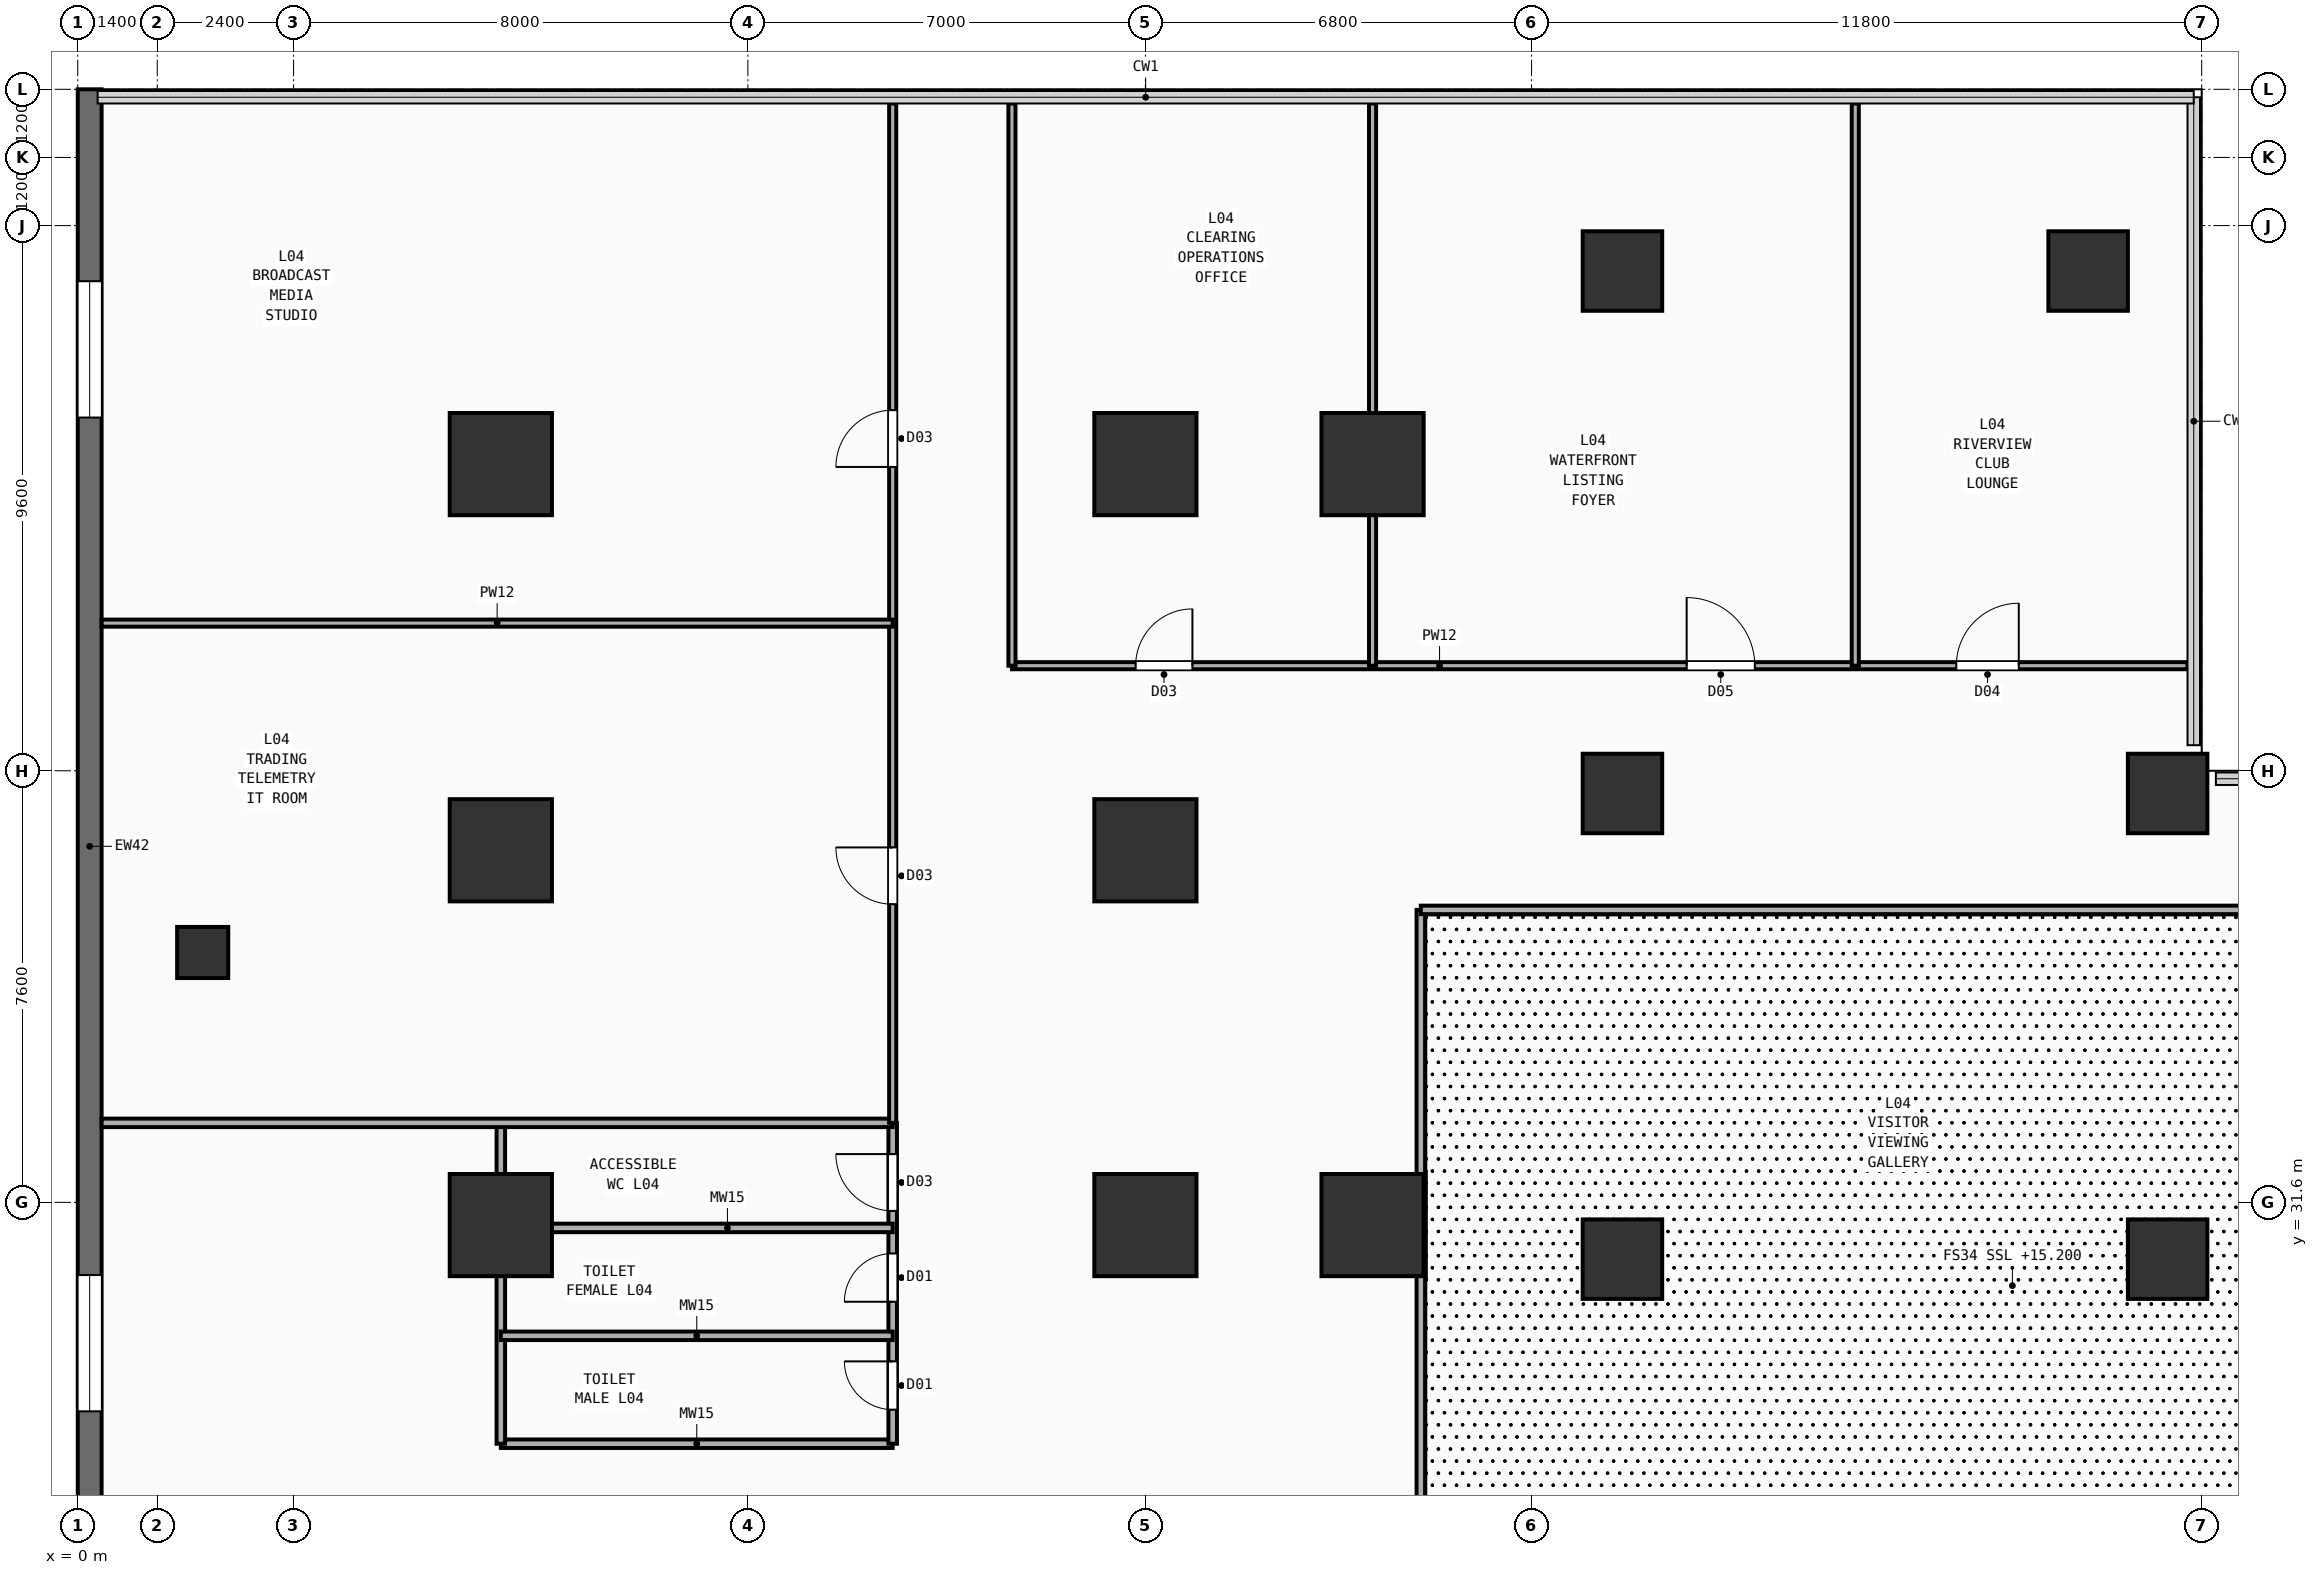
"""IFC4 building model, lengths in metres.
Left out: names, types, materials, properties, quantities, classifications, styles, units other than length and angle.
Written with IfcOpenShell. Run it as: python <this file> out.ifc"""

import sys

from ifc_helpers import new_model, si_unit, direction, frame, frame_2d, origin, origin_2d, place, context, subcontext, project, spatial, rectangle, extrude, element, fill, save


model = new_model("IFC4")
c1 = context("Model", 3, precision=1e-05, world=origin(), true_north=direction((0.0, 1.0)))
c2 = subcontext(c1, "Body", "Model", "MODEL_VIEW")
j1 = project(units=[si_unit("LENGTHUNIT", "METRE"), si_unit("PLANEANGLEUNIT", "RADIAN")], contexts=[c1])
p1 = place(None, origin())
s1 = spatial("IfcSite", under=j1, at=p1, CompositionType="ELEMENT")
p2 = place(p1, origin())
s2 = spatial("IfcBuilding", under=s1, at=p2, CompositionType="ELEMENT")
p3 = place(p2, frame((0.0, 0.0, 15.2)))
s3 = spatial("IfcBuildingStorey", under=s2, at=p3, CompositionType="ELEMENT", Elevation=15.2)
for number, where, z_axis, x_axis in (
    (1, (7.45, 31.2, 0.0), (0.0, 0.0, 1.0), (1.0, 0.0, 0.0)),
    (2, (7.45, 37.8, 0.0), (0.0, 0.0, 1.0), (1.0, 0.0, 0.0)),
    (3, (7.45, 44.6, 0.0), (0.0, 0.0, 1.0), (1.0, 0.0, 0.0)),
    (4, (18.8, 31.2, 0.0), (0.0, 0.0, 1.0), (1.0, 0.0, 0.0)),
    (5, (18.8, 37.8, 0.0), (0.0, 0.0, 1.0), (1.0, 0.0, 0.0)),
    (6, (18.8, 44.6, 0.0), (0.0, 0.0, 1.0), (1.0, 0.0, 0.0)),
    (7, (22.8, 31.2, 0.0), (0.0, 0.0, 1.0), (1.0, 0.0, 0.0)),
    (8, (22.8, 44.6, 0.0), (0.0, 0.0, 1.0), (1.0, 0.0, 0.0)),
):
    element("IfcColumn", number, at=place(p3, frame(where, z_axis=z_axis, x_axis=x_axis)), inside=s3, PredefinedType="COLUMN", context=c2, shape_type="SweptSolid", body=[
        extrude(rectangle(XDim=1.8, YDim=1.8, at=origin_2d()), origin(), (0.0, 0.0, 1.0), 4.46),
    ])
for number, where, z_axis, x_axis in (
    (9, (27.2, 30.6, 0.0), (0.0, 0.0, 1.0), (1.0, 0.0, 0.0)),
    (10, (36.8, 30.6, 0.0), (0.0, 0.0, 1.0), (1.0, 0.0, 0.0)),
    (11, (27.2, 38.8, 0.0), (0.0, 0.0, 1.0), (1.0, 0.0, 0.0)),
    (12, (36.8, 38.8, 0.0), (0.0, 0.0, 1.0), (1.0, 0.0, 0.0)),
    (13, (27.2, 48.0, 0.0), (0.0, 0.0, 1.0), (1.0, 0.0, 0.0)),
    (14, (35.4, 48.0, 0.0), (0.0, 0.0, 1.0), (1.0, 0.0, 0.0)),
):
    element("IfcColumn", number, at=place(p3, frame(where, z_axis=z_axis, x_axis=x_axis)), inside=s3, PredefinedType="COLUMN", context=c2, shape_type="SweptSolid", body=[
        extrude(rectangle(XDim=1.4, YDim=1.4, at=origin_2d()), origin(), (0.0, 0.0, 1.0), 4.46),
    ])
p4 = place(p3, frame((2.2, 36.0, 0.0), z_axis=(0.0, 0.0, 1.0), x_axis=(1.0, 0.0, 0.0)))
e15 = element("IfcColumn", 15, at=p4, inside=s3, PredefinedType="PILASTER", context=c2, shape_type="SweptSolid", body=[
    extrude(rectangle(XDim=0.9, YDim=0.9, at=origin_2d()), origin(), (0.0, 0.0, 1.0), 4.46),
])
p5 = place(p3, frame((0.21, 0.42, 0.0), z_axis=(0.0, 0.0, 1.0), x_axis=(0.0, 1.0, 0.0)))
e16 = element("IfcWall", 16, at=p5, inside=s3, PredefinedType="SOLIDWALL", context=c2, shape_type="SweptSolid", body=[
    extrude(rectangle(XDim=50.78, YDim=0.42, at=frame_2d((25.39, 0.0))), origin(), (0.0, 0.0, 1.0), 4.46),
])
p6 = place(p5, frame((8.0, 0.0, 0.95)))
e17 = element("IfcOpeningElement", 17, at=p6, cuts=e16, PredefinedType="OPENING", context=c2, shape_type="SweptSolid", body=[
    extrude(rectangle(XDim=2.4, YDim=2.1, at=frame_2d((1.2, 1.05))), frame((0.0, 0.22, 0.0), z_axis=(0.0, -1.0, 0.0), x_axis=(1.0, 0.0, 0.0)), (0.0, 0.0, 1.0), 0.44),
])
p7 = place(p5, frame((18.0, 0.0, 0.95)))
e18 = element("IfcOpeningElement", 18, at=p7, cuts=e16, PredefinedType="OPENING", context=c2, shape_type="SweptSolid", body=[
    extrude(rectangle(XDim=2.4, YDim=2.1, at=frame_2d((1.2, 1.05))), frame((0.0, 0.22, 0.0), z_axis=(0.0, -1.0, 0.0), x_axis=(1.0, 0.0, 0.0)), (0.0, 0.0, 1.0), 0.44),
])
p8 = place(p5, frame((27.5, 0.0, 0.95)))
e19 = element("IfcOpeningElement", 19, at=p8, cuts=e16, PredefinedType="OPENING", context=c2, shape_type="SweptSolid", body=[
    extrude(rectangle(XDim=2.4, YDim=2.1, at=frame_2d((1.2, 1.05))), frame((0.0, 0.22, 0.0), z_axis=(0.0, -1.0, 0.0), x_axis=(1.0, 0.0, 0.0)), (0.0, 0.0, 1.0), 0.44),
])
p9 = place(p5, frame((45.0, 0.0, 0.95)))
e20 = element("IfcOpeningElement", 20, at=p9, cuts=e16, PredefinedType="OPENING", context=c2, shape_type="SweptSolid", body=[
    extrude(rectangle(XDim=2.4, YDim=2.1, at=frame_2d((1.2, 1.05))), frame((0.0, 0.22, 0.0), z_axis=(0.0, -1.0, 0.0), x_axis=(1.0, 0.0, 0.0)), (0.0, 0.0, 1.0), 0.44),
])
p10 = place(p3, frame((7.45, 27.35, 0.0), z_axis=(0.0, 0.0, 1.0), x_axis=(1.0, 0.0, 0.0)))
e21 = element("IfcWall", 21, at=p10, inside=s3, PredefinedType="PLUMBINGWALL", context=c2, shape_type="SweptSolid", body=[
    extrude(rectangle(XDim=6.9, YDim=0.15, at=frame_2d((3.45, 0.0))), origin(), (0.0, 0.0, 1.0), 4.46),
])
p11 = place(p3, frame((7.45, 27.35, 0.0), z_axis=(0.0, 0.0, 1.0), x_axis=(0.0, 1.0, 0.0)))
e22 = element("IfcWall", 22, at=p11, inside=s3, PredefinedType="PLUMBINGWALL", context=c2, shape_type="SweptSolid", body=[
    extrude(rectangle(XDim=5.65, YDim=0.15, at=frame_2d((2.825, 0.0))), origin(), (0.0, 0.0, 1.0), 4.1),
])
p12 = place(p3, frame((14.35, 27.35, 0.0), z_axis=(0.0, 0.0, 1.0), x_axis=(0.0, 1.0, 0.0)))
e23 = element("IfcWall", 23, at=p12, inside=s3, PredefinedType="PLUMBINGWALL", context=c2, shape_type="SweptSolid", body=[
    extrude(rectangle(XDim=5.65, YDim=0.15, at=frame_2d((2.825, 0.0))), origin(), (0.0, 0.0, 1.0), 4.46),
])
p13 = place(p12, frame((0.6, 0.0, 0.0)))
e24 = element("IfcOpeningElement", 24, at=p13, cuts=e23, PredefinedType="OPENING", context=c2, shape_type="SweptSolid", body=[
    extrude(rectangle(XDim=0.85, YDim=2.15, at=frame_2d((0.425, 1.075))), frame((0.0, 0.085, 0.0), z_axis=(0.0, -1.0, 0.0), x_axis=(1.0, 0.0, 0.0)), (0.0, 0.0, 1.0), 0.17),
])
p14 = place(p12, frame((2.5, 0.0, 0.0)))
e25 = element("IfcOpeningElement", 25, at=p14, cuts=e23, PredefinedType="OPENING", context=c2, shape_type="SweptSolid", body=[
    extrude(rectangle(XDim=0.85, YDim=2.15, at=frame_2d((0.425, 1.075))), frame((0.0, 0.085, 0.0), z_axis=(0.0, -1.0, 0.0), x_axis=(1.0, 0.0, 0.0)), (0.0, 0.0, 1.0), 0.17),
])
p15 = place(p12, frame((4.1, 0.0, 0.0)))
e26 = element("IfcOpeningElement", 26, at=p15, cuts=e23, PredefinedType="OPENING", context=c2, shape_type="SweptSolid", body=[
    extrude(rectangle(XDim=1.0, YDim=2.2, at=frame_2d((0.5, 1.1))), frame((0.0, 0.085, 0.0), z_axis=(0.0, -1.0, 0.0), x_axis=(1.0, 0.0, 0.0)), (0.0, 0.0, 1.0), 0.17),
])
p16 = place(p3, frame((7.45, 29.25, 0.0), z_axis=(0.0, 0.0, 1.0), x_axis=(1.0, 0.0, 0.0)))
e27 = element("IfcWall", 27, at=p16, inside=s3, PredefinedType="PLUMBINGWALL", context=c2, shape_type="SweptSolid", body=[
    extrude(rectangle(XDim=6.9, YDim=0.15, at=frame_2d((3.45, 0.0))), origin(), (0.0, 0.0, 1.0), 3.96),
])
p17 = place(p3, frame((7.45, 31.15, 0.0), z_axis=(0.0, 0.0, 1.0), x_axis=(1.0, 0.0, 0.0)))
e28 = element("IfcWall", 28, at=p17, inside=s3, PredefinedType="PLUMBINGWALL", context=c2, shape_type="SweptSolid", body=[
    extrude(rectangle(XDim=6.9, YDim=0.15, at=frame_2d((3.45, 0.0))), origin(), (0.0, 0.0, 1.0), 3.81),
])
p18 = place(p3, frame((0.42, 33.0, 0.0), z_axis=(0.0, 0.0, 1.0), x_axis=(1.0, 0.0, 0.0)))
e29 = element("IfcWall", 29, at=p18, inside=s3, PredefinedType="PLUMBINGWALL", context=c2, shape_type="SweptSolid", body=[
    extrude(rectangle(XDim=13.93, YDim=0.15, at=frame_2d((6.965, 0.0))), origin(), (0.0, 0.0, 1.0), 4.46),
])
p19 = place(p3, frame((23.65, 16.35, 0.0), z_axis=(0.0, 0.0, 1.0), x_axis=(0.0, 1.0, 0.0)))
e30 = element("IfcWall", 30, at=p19, inside=s3, PredefinedType="PARTITIONING", context=c2, shape_type="SweptSolid", body=[
    extrude(rectangle(XDim=20.4, YDim=0.15, at=frame_2d((10.2, 0.0))), origin(), (0.0, 0.0, 1.0), 4.46),
])
p20 = place(p3, frame((23.65, 36.75, 0.0), z_axis=(0.0, 0.0, 1.0), x_axis=(1.0, 0.0, 0.0)))
e31 = element("IfcWall", 31, at=p20, inside=s3, PredefinedType="PARTITIONING", context=c2, shape_type="SweptSolid", body=[
    extrude(rectangle(XDim=40.9, YDim=0.15, at=frame_2d((20.45, 0.0))), origin(), (0.0, 0.0, 1.0), 4.46),
])
p21 = place(p3, frame((14.35, 33.0, 0.0), z_axis=(0.0, 0.0, 1.0), x_axis=(0.0, 1.0, 0.0)))
e32 = element("IfcWall", 32, at=p21, inside=s3, PredefinedType="PARTITIONING", context=c2, shape_type="SweptSolid", body=[
    extrude(rectangle(XDim=17.95, YDim=0.125, at=frame_2d((8.975, 0.0))), origin(), (0.0, 0.0, 1.0), 4.46),
])
p22 = place(p21, frame((3.85, 0.0, 0.0)))
e33 = element("IfcOpeningElement", 33, at=p22, cuts=e32, PredefinedType="OPENING", context=c2, shape_type="SweptSolid", body=[
    extrude(rectangle(XDim=1.0, YDim=2.2, at=frame_2d((0.5, 1.1))), frame((0.0, 0.073, 0.0), z_axis=(0.0, -1.0, 0.0), x_axis=(1.0, 0.0, 0.0)), (0.0, 0.0, 1.0), 0.145),
])
p23 = place(p21, frame((11.55, 0.0, 0.0)))
e34 = element("IfcOpeningElement", 34, at=p23, cuts=e32, PredefinedType="OPENING", context=c2, shape_type="SweptSolid", body=[
    extrude(rectangle(XDim=1.0, YDim=2.2, at=frame_2d((0.5, 1.1))), frame((0.0, 0.073, 0.0), z_axis=(0.0, -1.0, 0.0), x_axis=(1.0, 0.0, 0.0)), (0.0, 0.0, 1.0), 0.145),
])
p24 = place(p3, frame((0.42, 41.8, 0.0), z_axis=(0.0, 0.0, 1.0), x_axis=(1.0, 0.0, 0.0)))
e35 = element("IfcWall", 35, at=p24, inside=s3, PredefinedType="PARTITIONING", context=c2, shape_type="SweptSolid", body=[
    extrude(rectangle(XDim=13.93, YDim=0.125, at=frame_2d((6.965, 0.0))), origin(), (0.0, 0.0, 1.0), 4.46),
])
p25 = place(p3, frame((16.45, 41.05, 0.0), z_axis=(0.0, 0.0, 1.0), x_axis=(1.0, 0.0, 0.0)))
e36 = element("IfcWall", 36, at=p25, inside=s3, PredefinedType="PARTITIONING", context=c2, shape_type="SweptSolid", body=[
    extrude(rectangle(XDim=20.7, YDim=0.125, at=frame_2d((10.35, 0.0))), origin(), (0.0, 0.0, 1.0), 4.46),
])
p26 = place(p25, frame((2.178, 0.0, 0.0)))
e37 = element("IfcOpeningElement", 37, at=p26, cuts=e36, PredefinedType="OPENING", context=c2, shape_type="SweptSolid", body=[
    extrude(rectangle(XDim=1.0, YDim=2.2, at=frame_2d((0.5, 1.1))), frame((0.0, 0.073, 0.0), z_axis=(0.0, -1.0, 0.0), x_axis=(1.0, 0.0, 0.0)), (0.0, 0.0, 1.0), 0.145),
])
p27 = place(p25, frame((11.881, 0.0, 0.0)))
e38 = element("IfcOpeningElement", 38, at=p27, cuts=e36, PredefinedType="OPENING", context=c2, shape_type="SweptSolid", body=[
    extrude(rectangle(XDim=1.2, YDim=2.25, at=frame_2d((0.6, 1.125))), frame((0.0, 0.073, 0.0), z_axis=(0.0, -1.0, 0.0), x_axis=(1.0, 0.0, 0.0)), (0.0, 0.0, 1.0), 0.145),
])
p28 = place(p25, frame((16.629, 0.0, 0.0)))
e39 = element("IfcOpeningElement", 39, at=p28, cuts=e36, PredefinedType="OPENING", context=c2, shape_type="SweptSolid", body=[
    extrude(rectangle(XDim=1.1, YDim=2.2, at=frame_2d((0.55, 1.1))), frame((0.0, 0.073, 0.0), z_axis=(0.0, -1.0, 0.0), x_axis=(1.0, 0.0, 0.0)), (0.0, 0.0, 1.0), 0.145),
])
for number, where, z_axis, x_axis in (
    (40, (16.45, 41.05, 0.0), (0.0, 0.0, 1.0), (0.0, 1.0, 0.0)),
    (41, (22.8, 41.05, 0.0), (0.0, 0.0, 1.0), (0.0, 1.0, 0.0)),
    (42, (31.3, 41.05, 0.0), (0.0, 0.0, 1.0), (0.0, 1.0, 0.0)),
):
    element("IfcWall", number, at=place(p3, frame(where, z_axis=z_axis, x_axis=x_axis)), inside=s3, PredefinedType="PARTITIONING", context=c2, shape_type="SweptSolid", body=[
        extrude(rectangle(XDim=9.9, YDim=0.125, at=frame_2d((4.95, 0.0))), origin(), (0.0, 0.0, 1.0), 4.46),
    ])
p29 = place(p8, origin())
e43 = element("IfcWindow", 43, at=p29, inside=s3, PartitioningType="SINGLE_PANEL", PredefinedType="WINDOW", context=c2, shape_type="SweptSolid", body=[
    extrude(rectangle(XDim=2.4, YDim=2.1, at=frame_2d((1.2, 1.05))), frame((0.0, 0.03, 0.0), z_axis=(0.0, -1.0, 0.0), x_axis=(1.0, 0.0, 0.0)), (0.0, 0.0, 1.0), 0.06),
])
fill(e19, e43)
p30 = place(p9, origin())
e44 = element("IfcWindow", 44, at=p30, inside=s3, PartitioningType="SINGLE_PANEL", PredefinedType="WINDOW", context=c2, shape_type="SweptSolid", body=[
    extrude(rectangle(XDim=2.4, YDim=2.1, at=frame_2d((1.2, 1.05))), frame((0.0, 0.03, 0.0), z_axis=(0.0, -1.0, 0.0), x_axis=(1.0, 0.0, 0.0)), (0.0, 0.0, 1.0), 0.06),
])
fill(e20, e44)
p31 = place(p13, origin())
e45 = element("IfcDoor", 45, at=p31, inside=s3, OperationType="SINGLE_SWING_RIGHT", PredefinedType="DOOR", context=c2, shape_type="SweptSolid", body=[
    extrude(rectangle(XDim=0.85, YDim=2.15, at=frame_2d((0.425, 1.075))), frame((0.0, 0.025, 0.0), z_axis=(0.0, -1.0, 0.0), x_axis=(1.0, 0.0, 0.0)), (0.0, 0.0, 1.0), 0.05),
])
fill(e24, e45)
p32 = place(p14, origin())
e46 = element("IfcDoor", 46, at=p32, inside=s3, OperationType="SINGLE_SWING_LEFT", PredefinedType="DOOR", context=c2, shape_type="SweptSolid", body=[
    extrude(rectangle(XDim=0.85, YDim=2.15, at=frame_2d((0.425, 1.075))), frame((0.0, 0.025, 0.0), z_axis=(0.0, -1.0, 0.0), x_axis=(1.0, 0.0, 0.0)), (0.0, 0.0, 1.0), 0.05),
])
fill(e25, e46)
p33 = place(p15, origin())
e47 = element("IfcDoor", 47, at=p33, inside=s3, OperationType="SINGLE_SWING_RIGHT", PredefinedType="DOOR", context=c2, shape_type="SweptSolid", body=[
    extrude(rectangle(XDim=1.0, YDim=2.2, at=frame_2d((0.5, 1.1))), frame((0.0, 0.025, 0.0), z_axis=(0.0, -1.0, 0.0), x_axis=(1.0, 0.0, 0.0)), (0.0, 0.0, 1.0), 0.05),
])
fill(e26, e47)
p34 = place(p22, origin())
e48 = element("IfcDoor", 48, at=p34, inside=s3, OperationType="SINGLE_SWING_RIGHT", PredefinedType="DOOR", context=c2, shape_type="SweptSolid", body=[
    extrude(rectangle(XDim=1.0, YDim=2.2, at=frame_2d((0.5, 1.1))), frame((0.0, 0.025, 0.0), z_axis=(0.0, -1.0, 0.0), x_axis=(1.0, 0.0, 0.0)), (0.0, 0.0, 1.0), 0.05),
])
fill(e33, e48)
p35 = place(p23, origin())
e49 = element("IfcDoor", 49, at=p35, inside=s3, OperationType="SINGLE_SWING_LEFT", PredefinedType="DOOR", context=c2, shape_type="SweptSolid", body=[
    extrude(rectangle(XDim=1.0, YDim=2.2, at=frame_2d((0.5, 1.1))), frame((0.0, 0.025, 0.0), z_axis=(0.0, -1.0, 0.0), x_axis=(1.0, 0.0, 0.0)), (0.0, 0.0, 1.0), 0.05),
])
fill(e34, e49)
p36 = place(p26, origin())
e50 = element("IfcDoor", 50, at=p36, inside=s3, OperationType="SINGLE_SWING_RIGHT", PredefinedType="DOOR", context=c2, shape_type="SweptSolid", body=[
    extrude(rectangle(XDim=1.0, YDim=2.2, at=frame_2d((0.5, 1.1))), frame((0.0, 0.025, 0.0), z_axis=(0.0, -1.0, 0.0), x_axis=(1.0, 0.0, 0.0)), (0.0, 0.0, 1.0), 0.05),
])
fill(e37, e50)
p37 = place(p27, origin())
e51 = element("IfcDoor", 51, at=p37, inside=s3, OperationType="SINGLE_SWING_LEFT", PredefinedType="DOOR", context=c2, shape_type="SweptSolid", body=[
    extrude(rectangle(XDim=1.2, YDim=2.25, at=frame_2d((0.6, 1.125))), frame((0.0, 0.025, 0.0), z_axis=(0.0, -1.0, 0.0), x_axis=(1.0, 0.0, 0.0)), (0.0, 0.0, 1.0), 0.05),
])
fill(e38, e51)
p38 = place(p28, origin())
e52 = element("IfcDoor", 52, at=p38, inside=s3, OperationType="SINGLE_SWING_RIGHT", PredefinedType="DOOR", context=c2, shape_type="SweptSolid", body=[
    extrude(rectangle(XDim=1.1, YDim=2.2, at=frame_2d((0.55, 1.1))), frame((0.0, 0.025, 0.0), z_axis=(0.0, -1.0, 0.0), x_axis=(1.0, 0.0, 0.0)), (0.0, 0.0, 1.0), 0.05),
])
fill(e39, e52)
save(model, sys.argv[1])
